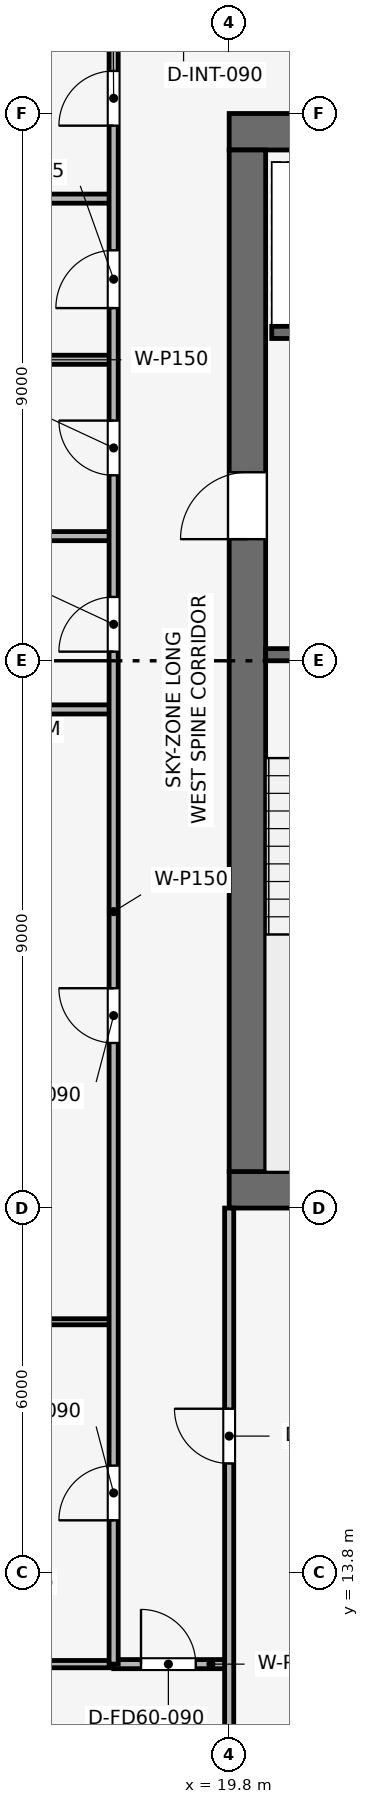
"""IFC4 building model, lengths in metres.
Left out: names, types, materials, properties, quantities, classifications, styles, units other than length and angle.
Written with IfcOpenShell. Run it as: python <this file> out.ifc"""

import sys

from ifc_helpers import new_model, si_unit, direction, frame, frame_2d, origin, place, context, subcontext, project, spatial, rectangle, extrude, element, fill, save


model = new_model("IFC4")
c1 = context("Model", 3, precision=1e-05, world=origin(), true_north=direction((0.0, 1.0)))
c2 = subcontext(c1, "Body", "Model", "MODEL_VIEW")
j1 = project(units=[si_unit("LENGTHUNIT", "METRE"), si_unit("PLANEANGLEUNIT", "RADIAN")], contexts=[c1])
p1 = place(None, origin())
s1 = spatial("IfcSite", under=j1, at=p1, CompositionType="ELEMENT")
p2 = place(p1, origin())
s2 = spatial("IfcBuilding", under=s1, at=p2, CompositionType="ELEMENT")
p3 = place(p2, frame((0.0, 0.0, 299.25)))
s3 = spatial("IfcBuildingStorey", under=s2, at=p3, CompositionType="ELEMENT", Elevation=299.25)
p4 = place(p3, frame((19.8, 20.1, 0.0), z_axis=(0.0, 0.0, 1.0), x_axis=(1.0, 0.0, 0.0)))
e1 = element("IfcWall", 1, at=p4, inside=s3, PredefinedType="SHEAR", context=c2, shape_type="SweptSolid", body=[
    extrude(rectangle(XDim=18.0, YDim=0.6, at=frame_2d((9.0, 0.0))), origin(), (0.0, 0.0, 1.0), 3.75),
])
p5 = place(p3, frame((19.8, 37.5, 0.0), z_axis=(0.0, 0.0, 1.0), x_axis=(1.0, 0.0, 0.0)))
e2 = element("IfcWall", 2, at=p5, inside=s3, PredefinedType="SHEAR", context=c2, shape_type="SweptSolid", body=[
    extrude(rectangle(XDim=18.0, YDim=0.6, at=frame_2d((9.0, 0.0))), origin(), (0.0, 0.0, 1.0), 3.75),
])
p6 = place(p5, frame((7.05, 0.0, 0.0)))
e3 = element("IfcOpeningElement", 3, at=p6, cuts=e2, PredefinedType="OPENING", context=c2, shape_type="SweptSolid", body=[
    extrude(rectangle(XDim=1.1, YDim=2.15, at=frame_2d((0.55, 1.075))), frame((0.0, 0.31, 0.0), z_axis=(0.0, -1.0, 0.0), x_axis=(1.0, 0.0, 0.0)), (0.0, 0.0, 1.0), 0.62),
])
p7 = place(p3, frame((20.1, 20.4, 0.0), z_axis=(0.0, 0.0, 1.0), x_axis=(0.0, 1.0, 0.0)))
e4 = element("IfcWall", 4, at=p7, inside=s3, PredefinedType="SHEAR", context=c2, shape_type="SweptSolid", body=[
    extrude(rectangle(XDim=16.8, YDim=0.6, at=frame_2d((8.4, 0.0))), origin(), (0.0, 0.0, 1.0), 3.75),
])
p8 = place(p7, frame((10.4, 0.0, 0.0)))
e5 = element("IfcOpeningElement", 5, at=p8, cuts=e4, PredefinedType="OPENING", context=c2, shape_type="SweptSolid", body=[
    extrude(rectangle(XDim=1.1, YDim=2.15, at=frame_2d((0.55, 1.075))), frame((0.0, 0.31, 0.0), z_axis=(0.0, -1.0, 0.0), x_axis=(1.0, 0.0, 0.0)), (0.0, 0.0, 1.0), 0.62),
])
p9 = place(p3, frame((20.4, 28.9, 0.0), z_axis=(0.0, 0.0, 1.0), x_axis=(1.0, 0.0, 0.0)))
e6 = element("IfcWall", 6, at=p9, inside=s3, PredefinedType="SHEAR", context=c2, shape_type="SweptSolid", body=[
    extrude(rectangle(XDim=3.15, YDim=0.2, at=frame_2d((1.575, 0.0))), origin(), (0.0, 0.0, 1.0), 3.51),
])
p10 = place(p9, frame((0.8, 0.0, 0.0)))
e7 = element("IfcOpeningElement", 7, at=p10, cuts=e6, PredefinedType="OPENING", context=c2, shape_type="SweptSolid", body=[
    extrude(rectangle(XDim=1.0, YDim=2.1, at=frame_2d((0.5, 1.05))), frame((0.0, 0.11, 0.0), z_axis=(0.0, -1.0, 0.0), x_axis=(1.0, 0.0, 0.0)), (0.0, 0.0, 1.0), 0.22),
])
p11 = place(p3, frame((20.5, 34.2, 0.0), z_axis=(0.0, 0.0, 1.0), x_axis=(1.0, 0.0, 0.0)))
e8 = element("IfcWall", 8, at=p11, inside=s3, PredefinedType="SHEAR", context=c2, shape_type="SweptSolid", body=[
    extrude(rectangle(XDim=3.05, YDim=0.2, at=frame_2d((1.525, 0.0))), origin(), (0.0, 0.0, 1.0), 3.51),
])
p12 = place(p11, frame((0.75, 0.0, 0.0)))
e9 = element("IfcOpeningElement", 9, at=p12, cuts=e8, PredefinedType="OPENING", context=c2, shape_type="SweptSolid", body=[
    extrude(rectangle(XDim=1.1, YDim=2.15, at=frame_2d((0.55, 1.075))), frame((0.0, 0.11, 0.0), z_axis=(0.0, -1.0, 0.0), x_axis=(1.0, 0.0, 0.0)), (0.0, 0.0, 1.0), 0.22),
])
p13 = place(p3, frame((6.13, 28.0, 0.0), z_axis=(0.0, 0.0, 1.0), x_axis=(1.0, 0.0, 0.0)))
e10 = element("IfcWall", 10, at=p13, inside=s3, PredefinedType="PARTITIONING", context=c2, shape_type="SweptSolid", body=[
    extrude(rectangle(XDim=11.77, YDim=0.15, at=frame_2d((5.885, 0.0))), origin(), (0.0, 0.0, 1.0), 3.135),
])
for number, where, z_axis, x_axis in (
    (11, (14.8, 36.4, 0.0), (0.0, 0.0, 1.0), (1.0, 0.0, 0.0)),
    (12, (14.8, 30.85, 0.0), (0.0, 0.0, 1.0), (1.0, 0.0, 0.0)),
    (13, (14.8, 33.75, 0.0), (0.0, 0.0, 1.0), (1.0, 0.0, 0.0)),
):
    element("IfcWall", number, at=place(p3, frame(where, z_axis=z_axis, x_axis=x_axis)), inside=s3, PredefinedType="PARTITIONING", context=c2, shape_type="SweptSolid", body=[
        extrude(rectangle(XDim=3.1, YDim=0.15, at=frame_2d((1.55, 0.0))), origin(), (0.0, 0.0, 1.0), 3.135),
    ])
p14 = place(p3, frame((6.13, 17.93, 0.0), z_axis=(0.0, 0.0, 1.0), x_axis=(1.0, 0.0, 0.0)))
e14 = element("IfcWall", 14, at=p14, inside=s3, PredefinedType="MOVABLE", context=c2, shape_type="SweptSolid", body=[
    extrude(rectangle(XDim=11.77, YDim=0.1, at=frame_2d((5.885, 0.0))), origin(), (0.0, 0.0, 1.0), 3.095),
])
p15 = place(p3, frame((12.3, 12.3, 0.0), z_axis=(0.0, 0.0, 1.0), x_axis=(1.0, 0.0, 0.0)))
e15 = element("IfcWall", 15, at=p15, inside=s3, PredefinedType="PARTITIONING", context=c2, shape_type="SweptSolid", body=[
    extrude(rectangle(XDim=5.6, YDim=0.12, at=frame_2d((2.8, 0.0))), origin(), (0.0, 0.0, 1.0), 3.195),
])
p16 = place(p3, frame((17.9, 12.3, 0.0), z_axis=(0.0, 0.0, 1.0), x_axis=(1.0, 0.0, 0.0)))
e16 = element("IfcWall", 16, at=p16, inside=s3, PredefinedType="PARTITIONING", context=c2, shape_type="SweptSolid", body=[
    extrude(rectangle(XDim=1.9, YDim=0.15, at=frame_2d((0.95, 0.0))), origin(), (0.0, 0.0, 1.0), 3.51),
])
p17 = place(p16, frame((0.45, 0.0, 0.0)))
e17 = element("IfcOpeningElement", 17, at=p17, cuts=e16, PredefinedType="OPENING", context=c2, shape_type="SweptSolid", body=[
    extrude(rectangle(XDim=0.9, YDim=2.1, at=frame_2d((0.45, 1.05))), frame((0.0, 0.085, 0.0), z_axis=(0.0, -1.0, 0.0), x_axis=(1.0, 0.0, 0.0)), (0.0, 0.0, 1.0), 0.17),
])
p18 = place(p3, frame((19.8, 6.13, 0.0), z_axis=(0.0, 0.0, 1.0), x_axis=(0.0, 1.0, 0.0)))
e18 = element("IfcWall", 18, at=p18, inside=s3, PredefinedType="PARTITIONING", context=c2, shape_type="SweptSolid", body=[
    extrude(rectangle(XDim=13.67, YDim=0.15, at=frame_2d((6.835, 0.0))), origin(), (0.0, 0.0, 1.0), 3.095),
])
p19 = place(p18, frame((9.47, 0.0, 0.0)))
e19 = element("IfcOpeningElement", 19, at=p19, cuts=e18, PredefinedType="OPENING", context=c2, shape_type="SweptSolid", body=[
    extrude(rectangle(XDim=0.9, YDim=2.1, at=frame_2d((0.45, 1.05))), frame((0.0, 0.085, 0.0), z_axis=(0.0, -1.0, 0.0), x_axis=(1.0, 0.0, 0.0)), (0.0, 0.0, 1.0), 0.17),
])
p20 = place(p3, frame((17.9, 12.3, 0.0), z_axis=(0.0, 0.0, 1.0), x_axis=(0.0, 1.0, 0.0)))
e20 = element("IfcWall", 20, at=p20, inside=s3, PredefinedType="PARTITIONING", context=c2, shape_type="SweptSolid", body=[
    extrude(rectangle(XDim=27.4, YDim=0.15, at=frame_2d((13.7, 0.0))), origin(), (0.0, 0.0, 1.0), 3.095),
])
p21 = place(p20, frame((2.365, 0.0, 0.0)))
e21 = element("IfcOpeningElement", 21, at=p21, cuts=e20, PredefinedType="OPENING", context=c2, shape_type="SweptSolid", body=[
    extrude(rectangle(XDim=0.9, YDim=2.1, at=frame_2d((0.45, 1.05))), frame((0.0, 0.085, 0.0), z_axis=(0.0, -1.0, 0.0), x_axis=(1.0, 0.0, 0.0)), (0.0, 0.0, 1.0), 0.17),
])
p22 = place(p20, frame((10.215, 0.0, 0.0)))
e22 = element("IfcOpeningElement", 22, at=p22, cuts=e20, PredefinedType="OPENING", context=c2, shape_type="SweptSolid", body=[
    extrude(rectangle(XDim=0.9, YDim=2.1, at=frame_2d((0.45, 1.05))), frame((0.0, 0.085, 0.0), z_axis=(0.0, -1.0, 0.0), x_axis=(1.0, 0.0, 0.0)), (0.0, 0.0, 1.0), 0.17),
])
p23 = place(p20, frame((16.65, 0.0, 0.0)))
e23 = element("IfcOpeningElement", 23, at=p23, cuts=e20, PredefinedType="OPENING", context=c2, shape_type="SweptSolid", body=[
    extrude(rectangle(XDim=0.9, YDim=2.1, at=frame_2d((0.45, 1.05))), frame((0.0, 0.085, 0.0), z_axis=(0.0, -1.0, 0.0), x_axis=(1.0, 0.0, 0.0)), (0.0, 0.0, 1.0), 0.17),
])
p24 = place(p20, frame((19.55, 0.0, 0.0)))
e24 = element("IfcOpeningElement", 24, at=p24, cuts=e20, PredefinedType="OPENING", context=c2, shape_type="SweptSolid", body=[
    extrude(rectangle(XDim=0.9, YDim=2.1, at=frame_2d((0.45, 1.05))), frame((0.0, 0.085, 0.0), z_axis=(0.0, -1.0, 0.0), x_axis=(1.0, 0.0, 0.0)), (0.0, 0.0, 1.0), 0.17),
])
p25 = place(p20, frame((22.3, 0.0, 0.0)))
e25 = element("IfcOpeningElement", 25, at=p25, cuts=e20, PredefinedType="OPENING", context=c2, shape_type="SweptSolid", body=[
    extrude(rectangle(XDim=0.95, YDim=2.1, at=frame_2d((0.475, 1.05))), frame((0.0, 0.085, 0.0), z_axis=(0.0, -1.0, 0.0), x_axis=(1.0, 0.0, 0.0)), (0.0, 0.0, 1.0), 0.17),
])
p26 = place(p20, frame((25.3, 0.0, 0.0)))
e26 = element("IfcOpeningElement", 26, at=p26, cuts=e20, PredefinedType="OPENING", context=c2, shape_type="SweptSolid", body=[
    extrude(rectangle(XDim=0.9, YDim=2.1, at=frame_2d((0.45, 1.05))), frame((0.0, 0.085, 0.0), z_axis=(0.0, -1.0, 0.0), x_axis=(1.0, 0.0, 0.0)), (0.0, 0.0, 1.0), 0.17),
])
p27 = place(p17, origin())
e27 = element("IfcDoor", 27, at=p27, inside=s3, OperationType="SINGLE_SWING_LEFT", PredefinedType="DOOR", context=c2, shape_type="SweptSolid", body=[
    extrude(rectangle(XDim=0.9, YDim=2.1, at=frame_2d((0.45, 1.05))), frame((0.0, 0.025, 0.0), z_axis=(0.0, -1.0, 0.0), x_axis=(1.0, 0.0, 0.0)), (0.0, 0.0, 1.0), 0.05),
])
fill(e17, e27)
p28 = place(p19, origin())
e28 = element("IfcDoor", 28, at=p28, inside=s3, OperationType="SINGLE_SWING_RIGHT", PredefinedType="DOOR", context=c2, shape_type="SweptSolid", body=[
    extrude(rectangle(XDim=0.9, YDim=2.1, at=frame_2d((0.45, 1.05))), frame((0.0, 0.025, 0.0), z_axis=(0.0, -1.0, 0.0), x_axis=(1.0, 0.0, 0.0)), (0.0, 0.0, 1.0), 0.05),
])
fill(e19, e28)
p29 = place(p21, origin())
e29 = element("IfcDoor", 29, at=p29, inside=s3, OperationType="SINGLE_SWING_LEFT", PredefinedType="DOOR", context=c2, shape_type="SweptSolid", body=[
    extrude(rectangle(XDim=0.9, YDim=2.1, at=frame_2d((0.45, 1.05))), frame((0.0, 0.025, 0.0), z_axis=(0.0, -1.0, 0.0), x_axis=(1.0, 0.0, 0.0)), (0.0, 0.0, 1.0), 0.05),
])
fill(e21, e29)
p30 = place(p22, origin())
e30 = element("IfcDoor", 30, at=p30, inside=s3, OperationType="SINGLE_SWING_RIGHT", PredefinedType="DOOR", context=c2, shape_type="SweptSolid", body=[
    extrude(rectangle(XDim=0.9, YDim=2.1, at=frame_2d((0.45, 1.05))), frame((0.0, 0.025, 0.0), z_axis=(0.0, -1.0, 0.0), x_axis=(1.0, 0.0, 0.0)), (0.0, 0.0, 1.0), 0.05),
])
fill(e22, e30)
p31 = place(p23, origin())
e31 = element("IfcDoor", 31, at=p31, inside=s3, OperationType="SINGLE_SWING_LEFT", PredefinedType="DOOR", context=c2, shape_type="SweptSolid", body=[
    extrude(rectangle(XDim=0.9, YDim=2.1, at=frame_2d((0.45, 1.05))), frame((0.0, 0.025, 0.0), z_axis=(0.0, -1.0, 0.0), x_axis=(1.0, 0.0, 0.0)), (0.0, 0.0, 1.0), 0.05),
])
fill(e23, e31)
p32 = place(p24, origin())
e32 = element("IfcDoor", 32, at=p32, inside=s3, OperationType="SINGLE_SWING_RIGHT", PredefinedType="DOOR", context=c2, shape_type="SweptSolid", body=[
    extrude(rectangle(XDim=0.9, YDim=2.1, at=frame_2d((0.45, 1.05))), frame((0.0, 0.025, 0.0), z_axis=(0.0, -1.0, 0.0), x_axis=(1.0, 0.0, 0.0)), (0.0, 0.0, 1.0), 0.05),
])
fill(e24, e32)
p33 = place(p25, origin())
e33 = element("IfcDoor", 33, at=p33, inside=s3, OperationType="SINGLE_SWING_LEFT", PredefinedType="DOOR", context=c2, shape_type="SweptSolid", body=[
    extrude(rectangle(XDim=0.95, YDim=2.1, at=frame_2d((0.475, 1.05))), frame((0.0, 0.025, 0.0), z_axis=(0.0, -1.0, 0.0), x_axis=(1.0, 0.0, 0.0)), (0.0, 0.0, 1.0), 0.05),
])
fill(e25, e33)
p34 = place(p26, origin())
e34 = element("IfcDoor", 34, at=p34, inside=s3, OperationType="SINGLE_SWING_LEFT", PredefinedType="DOOR", context=c2, shape_type="SweptSolid", body=[
    extrude(rectangle(XDim=0.9, YDim=2.1, at=frame_2d((0.45, 1.05))), frame((0.0, 0.025, 0.0), z_axis=(0.0, -1.0, 0.0), x_axis=(1.0, 0.0, 0.0)), (0.0, 0.0, 1.0), 0.05),
])
fill(e26, e34)
p35 = place(p8, origin())
e35 = element("IfcDoor", 35, at=p35, inside=s3, OperationType="SINGLE_SWING_LEFT", PredefinedType="DOOR", context=c2, shape_type="SweptSolid", body=[
    extrude(rectangle(XDim=1.1, YDim=2.15, at=frame_2d((0.55, 1.075))), frame((0.0, 0.025, 0.0), z_axis=(0.0, -1.0, 0.0), x_axis=(1.0, 0.0, 0.0)), (0.0, 0.0, 1.0), 0.05),
])
fill(e5, e35)
save(model, sys.argv[1])
